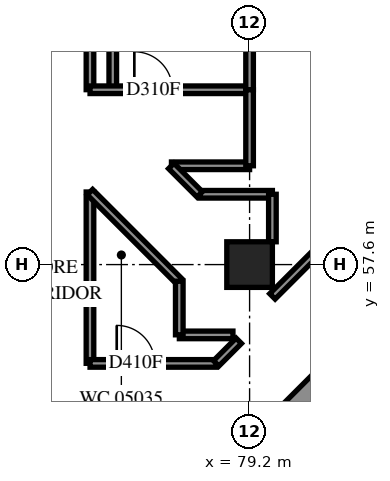
"""IFC4 building model, lengths in metres.
Left out: names, types, materials, properties, quantities, classifications, styles, units other than length and angle.
Written with IfcOpenShell. Run it as: python <this file> out.ifc"""

import sys

from ifc_helpers import new_model, si_unit, direction, frame, frame_2d, origin, origin_2d, place, context, subcontext, project, spatial, polyline, rectangle, outline, extrude, element, fill, save


model = new_model("IFC4")
c1 = context("Model", 3, precision=1e-05, world=origin(), true_north=direction((0.0, 1.0)))
c2 = subcontext(c1, "Body", "Model", "MODEL_VIEW")
j1 = project(units=[si_unit("LENGTHUNIT", "METRE"), si_unit("PLANEANGLEUNIT", "RADIAN")], contexts=[c1])
p1 = place(None, origin())
s1 = spatial("IfcSite", under=j1, at=p1, CompositionType="ELEMENT")
p2 = place(p1, origin())
s2 = spatial("IfcBuilding", under=s1, at=p2, CompositionType="ELEMENT")
p3 = place(p2, frame((0.0, 0.0, 22.8)))
s3 = spatial("IfcBuildingStorey", under=s2, at=p3, CompositionType="ELEMENT", Elevation=22.8)
p4 = place(p3, frame((79.2, 57.6, 0.0), z_axis=(0.0, 0.0, 1.0), x_axis=(1.0, 0.0, 0.0)))
e1 = element("IfcColumn", 1, at=p4, inside=s3, PredefinedType="COLUMN", context=c2, shape_type="SweptSolid", body=[
    extrude(rectangle(XDim=1.2, YDim=1.2, at=origin_2d()), origin(), (0.0, 0.0, 1.0), 3.9),
])
p5 = place(p3, frame((76.301, 49.443, -0.4), z_axis=(0.0, 0.0, 1.0), x_axis=(0.7071067812, 0.7071067812, 0.0)))
e2 = element("IfcWall", 2, at=p5, inside=s3, PredefinedType="SHEAR", context=c2, shape_type="SweptSolid", body=[
    extrude(rectangle(XDim=14.4, YDim=1.0, at=frame_2d((7.2, 0.0))), origin(), (0.0, 0.0, 1.0), 3.6),
])
p6 = place(p5, frame((4.55, 0.0, 0.4)))
e3 = element("IfcOpeningElement", 3, at=p6, cuts=e2, PredefinedType="OPENING", context=c2, shape_type="SweptSolid", body=[
    extrude(rectangle(XDim=1.1, YDim=2.1, at=frame_2d((0.55, 1.05))), frame((0.0, 0.51, 0.0), z_axis=(0.0, -1.0, 0.0), x_axis=(1.0, 0.0, 0.0)), (0.0, 0.0, 1.0), 1.02),
])
p7 = place(p5, frame((11.35, 0.0, 0.4)))
e4 = element("IfcOpeningElement", 4, at=p7, cuts=e2, PredefinedType="OPENING", context=c2, shape_type="SweptSolid", body=[
    extrude(rectangle(XDim=1.1, YDim=2.1, at=frame_2d((0.55, 1.05))), frame((0.0, 0.51, 0.0), z_axis=(0.0, -1.0, 0.0), x_axis=(1.0, 0.0, 0.0)), (0.0, 0.0, 1.0), 1.02),
])
p8 = place(p3, frame((117.843, 34.665, 0.0), z_axis=(0.0, 0.0, 1.0), x_axis=(-0.7071067812, 0.7071067812, 0.0)))
e5 = element("IfcWall", 5, at=p8, inside=s3, PredefinedType="SOLIDWALL", context=c2, shape_type="SweptSolid", body=[
    extrude(outline(polyline([(-0.275, -0.275), (54.222, -0.275), (53.994, 0.275), (0.275, 0.275), (-0.275, -0.275)])), origin(), (0.0, 0.0, 1.0), 3.9),
])
p9 = place(p8, frame((0.8, 0.0, 0.7)))
e6 = element("IfcOpeningElement", 6, at=p9, cuts=e5, PredefinedType="OPENING", context=c2, shape_type="SweptSolid", body=[
    extrude(rectangle(XDim=1.8, YDim=2.4, at=frame_2d((0.9, 1.2))), frame((0.0, 0.285, 0.0), z_axis=(0.0, -1.0, 0.0), x_axis=(1.0, 0.0, 0.0)), (0.0, 0.0, 1.0), 0.57),
])
p10 = place(p8, frame((4.225, 0.0, 0.7)))
e7 = element("IfcOpeningElement", 7, at=p10, cuts=e5, PredefinedType="OPENING", context=c2, shape_type="SweptSolid", body=[
    extrude(rectangle(XDim=1.8, YDim=2.4, at=frame_2d((0.9, 1.2))), frame((0.0, 0.285, 0.0), z_axis=(0.0, -1.0, 0.0), x_axis=(1.0, 0.0, 0.0)), (0.0, 0.0, 1.0), 0.57),
])
p11 = place(p8, frame((7.825, 0.0, 0.7)))
e8 = element("IfcOpeningElement", 8, at=p11, cuts=e5, PredefinedType="OPENING", context=c2, shape_type="SweptSolid", body=[
    extrude(rectangle(XDim=1.8, YDim=2.4, at=frame_2d((0.9, 1.2))), frame((0.0, 0.285, 0.0), z_axis=(0.0, -1.0, 0.0), x_axis=(1.0, 0.0, 0.0)), (0.0, 0.0, 1.0), 0.57),
])
p12 = place(p8, frame((11.425, 0.0, 0.7)))
e9 = element("IfcOpeningElement", 9, at=p12, cuts=e5, PredefinedType="OPENING", context=c2, shape_type="SweptSolid", body=[
    extrude(rectangle(XDim=1.8, YDim=2.4, at=frame_2d((0.9, 1.2))), frame((0.0, 0.285, 0.0), z_axis=(0.0, -1.0, 0.0), x_axis=(1.0, 0.0, 0.0)), (0.0, 0.0, 1.0), 0.57),
])
p13 = place(p8, frame((15.025, 0.0, 0.7)))
e10 = element("IfcOpeningElement", 10, at=p13, cuts=e5, PredefinedType="OPENING", context=c2, shape_type="SweptSolid", body=[
    extrude(rectangle(XDim=1.8, YDim=2.4, at=frame_2d((0.9, 1.2))), frame((0.0, 0.285, 0.0), z_axis=(0.0, -1.0, 0.0), x_axis=(1.0, 0.0, 0.0)), (0.0, 0.0, 1.0), 0.57),
])
p14 = place(p8, frame((18.625, 0.0, 0.7)))
e11 = element("IfcOpeningElement", 11, at=p14, cuts=e5, PredefinedType="OPENING", context=c2, shape_type="SweptSolid", body=[
    extrude(rectangle(XDim=1.8, YDim=2.4, at=frame_2d((0.9, 1.2))), frame((0.0, 0.285, 0.0), z_axis=(0.0, -1.0, 0.0), x_axis=(1.0, 0.0, 0.0)), (0.0, 0.0, 1.0), 0.57),
])
p15 = place(p8, frame((22.225, 0.0, 0.7)))
e12 = element("IfcOpeningElement", 12, at=p15, cuts=e5, PredefinedType="OPENING", context=c2, shape_type="SweptSolid", body=[
    extrude(rectangle(XDim=1.8, YDim=2.4, at=frame_2d((0.9, 1.2))), frame((0.0, 0.285, 0.0), z_axis=(0.0, -1.0, 0.0), x_axis=(1.0, 0.0, 0.0)), (0.0, 0.0, 1.0), 0.57),
])
p16 = place(p8, frame((25.825, 0.0, 0.7)))
e13 = element("IfcOpeningElement", 13, at=p16, cuts=e5, PredefinedType="OPENING", context=c2, shape_type="SweptSolid", body=[
    extrude(rectangle(XDim=1.8, YDim=2.4, at=frame_2d((0.9, 1.2))), frame((0.0, 0.285, 0.0), z_axis=(0.0, -1.0, 0.0), x_axis=(1.0, 0.0, 0.0)), (0.0, 0.0, 1.0), 0.57),
])
p17 = place(p8, frame((29.425, 0.0, 0.7)))
e14 = element("IfcOpeningElement", 14, at=p17, cuts=e5, PredefinedType="OPENING", context=c2, shape_type="SweptSolid", body=[
    extrude(rectangle(XDim=1.8, YDim=2.4, at=frame_2d((0.9, 1.2))), frame((0.0, 0.285, 0.0), z_axis=(0.0, -1.0, 0.0), x_axis=(1.0, 0.0, 0.0)), (0.0, 0.0, 1.0), 0.57),
])
p18 = place(p8, frame((33.025, 0.0, 0.7)))
e15 = element("IfcOpeningElement", 15, at=p18, cuts=e5, PredefinedType="OPENING", context=c2, shape_type="SweptSolid", body=[
    extrude(rectangle(XDim=1.8, YDim=2.4, at=frame_2d((0.9, 1.2))), frame((0.0, 0.285, 0.0), z_axis=(0.0, -1.0, 0.0), x_axis=(1.0, 0.0, 0.0)), (0.0, 0.0, 1.0), 0.57),
])
p19 = place(p8, frame((36.625, 0.0, 0.7)))
e16 = element("IfcOpeningElement", 16, at=p19, cuts=e5, PredefinedType="OPENING", context=c2, shape_type="SweptSolid", body=[
    extrude(rectangle(XDim=1.8, YDim=2.4, at=frame_2d((0.9, 1.2))), frame((0.0, 0.285, 0.0), z_axis=(0.0, -1.0, 0.0), x_axis=(1.0, 0.0, 0.0)), (0.0, 0.0, 1.0), 0.57),
])
p20 = place(p8, frame((40.225, 0.0, 0.7)))
e17 = element("IfcOpeningElement", 17, at=p20, cuts=e5, PredefinedType="OPENING", context=c2, shape_type="SweptSolid", body=[
    extrude(rectangle(XDim=1.8, YDim=2.4, at=frame_2d((0.9, 1.2))), frame((0.0, 0.285, 0.0), z_axis=(0.0, -1.0, 0.0), x_axis=(1.0, 0.0, 0.0)), (0.0, 0.0, 1.0), 0.57),
])
p21 = place(p8, frame((43.825, 0.0, 0.7)))
e18 = element("IfcOpeningElement", 18, at=p21, cuts=e5, PredefinedType="OPENING", context=c2, shape_type="SweptSolid", body=[
    extrude(rectangle(XDim=1.8, YDim=2.4, at=frame_2d((0.9, 1.2))), frame((0.0, 0.285, 0.0), z_axis=(0.0, -1.0, 0.0), x_axis=(1.0, 0.0, 0.0)), (0.0, 0.0, 1.0), 0.57),
])
p22 = place(p8, frame((47.425, 0.0, 0.7)))
e19 = element("IfcOpeningElement", 19, at=p22, cuts=e5, PredefinedType="OPENING", context=c2, shape_type="SweptSolid", body=[
    extrude(rectangle(XDim=1.8, YDim=2.4, at=frame_2d((0.9, 1.2))), frame((0.0, 0.285, 0.0), z_axis=(0.0, -1.0, 0.0), x_axis=(1.0, 0.0, 0.0)), (0.0, 0.0, 1.0), 0.57),
])
p23 = place(p8, frame((51.06, 0.0, 0.7)))
e20 = element("IfcOpeningElement", 20, at=p23, cuts=e5, PredefinedType="OPENING", context=c2, shape_type="SweptSolid", body=[
    extrude(rectangle(XDim=1.8, YDim=2.4, at=frame_2d((0.9, 1.2))), frame((0.0, 0.285, 0.0), z_axis=(0.0, -1.0, 0.0), x_axis=(1.0, 0.0, 0.0)), (0.0, 0.0, 1.0), 0.57),
])
p24 = place(p3, frame((75.6, 62.2, 0.0), z_axis=(0.0, 0.0, 1.0), x_axis=(0.0, 1.0, 0.0)))
e21 = element("IfcWall", 21, at=p24, inside=s3, PredefinedType="PARTITIONING", context=c2, shape_type="SweptSolid", body=[
    extrude(rectangle(XDim=10.45, YDim=0.2, at=frame_2d((5.225, 0.0))), origin(), (0.0, 0.0, 1.0), 3.9),
])
p25 = place(p3, frame((75.0, 62.202, 0.0), z_axis=(0.0, 0.0, 1.0), x_axis=(0.0, 1.0, 0.0)))
e22 = element("IfcWall", 22, at=p25, inside=s3, PredefinedType="PARTITIONING", context=c2, shape_type="SweptSolid", body=[
    extrude(rectangle(XDim=5.598, YDim=0.2, at=frame_2d((2.799, 0.0))), origin(), (0.0, 0.0, 1.0), 3.9),
])
p26 = place(p3, frame((75.0, 55.002, 0.0), z_axis=(0.0, 0.0, 1.0), x_axis=(0.0, 1.0, 0.0)))
e23 = element("IfcWall", 23, at=p26, inside=s3, PredefinedType="PARTITIONING", context=c2, shape_type="SweptSolid", body=[
    extrude(rectangle(XDim=4.508, YDim=0.2, at=frame_2d((2.254, 0.0))), origin(), (0.0, 0.0, 1.0), 3.9),
])
p27 = place(p3, frame((75.002, 62.2, 0.0), z_axis=(0.0, 0.0, 1.0), x_axis=(1.0, 0.0, 0.0)))
e24 = element("IfcWall", 24, at=p27, inside=s3, PredefinedType="PARTITIONING", context=c2, shape_type="SweptSolid", body=[
    extrude(rectangle(XDim=4.198, YDim=0.2, at=frame_2d((2.099, 0.0))), origin(), (0.0, 0.0, 1.0), 3.9),
])
p28 = place(p27, frame((1.165, 0.0, 0.0)))
e25 = element("IfcOpeningElement", 25, at=p28, cuts=e24, PredefinedType="OPENING", context=c2, shape_type="SweptSolid", body=[
    extrude(rectangle(XDim=1.0, YDim=2.1, at=frame_2d((0.5, 1.05))), frame((0.0, 0.11, 0.0), z_axis=(0.0, -1.0, 0.0), x_axis=(1.0, 0.0, 0.0)), (0.0, 0.0, 1.0), 0.22),
])
p29 = place(p3, frame((74.999, 59.507, 0.0), z_axis=(0.0, 0.0, 1.0), x_axis=(0.7071067812, -0.7071067812, 0.0)))
e26 = element("IfcWall", 26, at=p29, inside=s3, PredefinedType="PARTITIONING", context=c2, shape_type="SweptSolid", body=[
    extrude(rectangle(XDim=3.321, YDim=0.2, at=frame_2d((1.66, 0.0))), origin(), (0.0, 0.0, 1.0), 3.9),
])
p30 = place(p3, frame((75.002, 55.0, 0.0), z_axis=(0.0, 0.0, 1.0), x_axis=(1.0, 0.0, 0.0)))
e27 = element("IfcWall", 27, at=p30, inside=s3, PredefinedType="PARTITIONING", context=c2, shape_type="SweptSolid", body=[
    extrude(rectangle(XDim=3.32, YDim=0.2, at=frame_2d((1.66, 0.0))), origin(), (0.0, 0.0, 1.0), 3.9),
])
p31 = place(p30, frame((0.702, 0.0, 0.0)))
e28 = element("IfcOpeningElement", 28, at=p31, cuts=e27, PredefinedType="OPENING", context=c2, shape_type="SweptSolid", body=[
    extrude(rectangle(XDim=1.0, YDim=2.1, at=frame_2d((0.5, 1.05))), frame((0.0, 0.11, 0.0), z_axis=(0.0, -1.0, 0.0), x_axis=(1.0, 0.0, 0.0)), (0.0, 0.0, 1.0), 0.22),
])
p32 = place(p3, frame((77.144, 60.2, 0.0), z_axis=(0.0, 0.0, 1.0), x_axis=(1.0, 0.0, 0.0)))
e29 = element("IfcWall", 29, at=p32, inside=s3, PredefinedType="PARTITIONING", context=c2, shape_type="SweptSolid", body=[
    extrude(rectangle(XDim=2.056, YDim=0.2, at=frame_2d((1.028, 0.0))), origin(), (0.0, 0.0, 1.0), 3.9),
])
for number, where, z_axis, x_axis in (
    (30, (79.2, 62.2, 0.0), (0.0, 0.0, 1.0), (0.0, 1.0, 0.0)),
    (31, (79.2, 60.2, 0.0), (0.0, 0.0, 1.0), (0.0, 1.0, 0.0)),
):
    element("IfcWall", number, at=place(p3, frame(where, z_axis=z_axis, x_axis=x_axis)), inside=s3, PredefinedType="PARTITIONING", context=c2, shape_type="SweptSolid", body=[
        extrude(rectangle(XDim=2.0, YDim=0.2, at=frame_2d((1.0, 0.0))), origin(), (0.0, 0.0, 1.0), 3.9),
    ])
p33 = place(p3, frame((77.892, 59.45, 0.0), z_axis=(0.0, 0.0, 1.0), x_axis=(1.0, 0.0, 0.0)))
e32 = element("IfcWall", 32, at=p33, inside=s3, PredefinedType="PARTITIONING", context=c2, shape_type="SweptSolid", body=[
    extrude(rectangle(XDim=1.908, YDim=0.2, at=frame_2d((0.954, 0.0))), origin(), (0.0, 0.0, 1.0), 3.9),
])
p34 = place(p3, frame((79.801, 56.763, 0.0), z_axis=(0.0, 0.0, 1.0), x_axis=(0.7071067812, 0.7071067812, 0.0)))
e33 = element("IfcWall", 33, at=p34, inside=s3, PredefinedType="PARTITIONING", context=c2, shape_type="SweptSolid", body=[
    extrude(rectangle(XDim=1.765, YDim=0.2, at=frame_2d((0.882, 0.0))), origin(), (0.0, 0.0, 1.0), 3.9),
])
for number, where, z_axis, x_axis in (
    (34, (77.352, 55.75, 0.0), (0.0, 0.0, 1.0), (1.0, 0.0, 0.0)),
    (35, (77.35, 55.752, 0.0), (0.0, 0.0, 1.0), (0.0, 1.0, 0.0)),
):
    element("IfcWall", number, at=place(p3, frame(where, z_axis=z_axis, x_axis=x_axis)), inside=s3, PredefinedType="PARTITIONING", context=c2, shape_type="SweptSolid", body=[
        extrude(rectangle(XDim=1.41, YDim=0.2, at=frame_2d((0.705, 0.0))), origin(), (0.0, 0.0, 1.0), 3.9),
    ])
p35 = place(p3, frame((79.8, 58.2, 0.0), z_axis=(0.0, 0.0, 1.0), x_axis=(0.0, 1.0, 0.0)))
e36 = element("IfcWall", 36, at=p35, inside=s3, PredefinedType="PARTITIONING", context=c2, shape_type="SweptSolid", body=[
    extrude(rectangle(XDim=1.25, YDim=0.2, at=frame_2d((0.625, 0.0))), origin(), (0.0, 0.0, 1.0), 3.9),
])
p36 = place(p3, frame((77.139, 60.195, 0.0), z_axis=(0.0, 0.0, 1.0), x_axis=(0.7071067812, -0.7071067812, 0.0)))
e37 = element("IfcWall", 37, at=p36, inside=s3, PredefinedType="PARTITIONING", context=c2, shape_type="SweptSolid", body=[
    extrude(rectangle(XDim=1.058, YDim=0.2, at=frame_2d((0.529, 0.0))), origin(), (0.0, 0.0, 1.0), 3.9),
])
p37 = place(p3, frame((78.321, 55.001, 0.0), z_axis=(0.0, 0.0, 1.0), x_axis=(0.7071067812, 0.7071067812, 0.0)))
e38 = element("IfcWall", 38, at=p37, inside=s3, PredefinedType="PARTITIONING", context=c2, shape_type="SweptSolid", body=[
    extrude(rectangle(XDim=0.84, YDim=0.2, at=frame_2d((0.42, 0.0))), origin(), (0.0, 0.0, 1.0), 3.9),
])
p38 = place(p31, origin())
e39 = element("IfcDoor", 39, at=p38, inside=s3, OperationType="SINGLE_SWING_LEFT", PredefinedType="DOOR", context=c2, shape_type="SweptSolid", body=[
    extrude(rectangle(XDim=1.0, YDim=2.1, at=frame_2d((0.5, 1.05))), frame((0.0, 0.025, 0.0), z_axis=(0.0, -1.0, 0.0), x_axis=(1.0, 0.0, 0.0)), (0.0, 0.0, 1.0), 0.05),
])
fill(e28, e39)
p39 = place(p28, origin())
e40 = element("IfcDoor", 40, at=p39, inside=s3, OperationType="SINGLE_SWING_LEFT", PredefinedType="DOOR", context=c2, shape_type="SweptSolid", body=[
    extrude(rectangle(XDim=1.0, YDim=2.1, at=frame_2d((0.5, 1.05))), frame((0.0, 0.025, 0.0), z_axis=(0.0, -1.0, 0.0), x_axis=(1.0, 0.0, 0.0)), (0.0, 0.0, 1.0), 0.05),
])
fill(e25, e40)
save(model, sys.argv[1])
